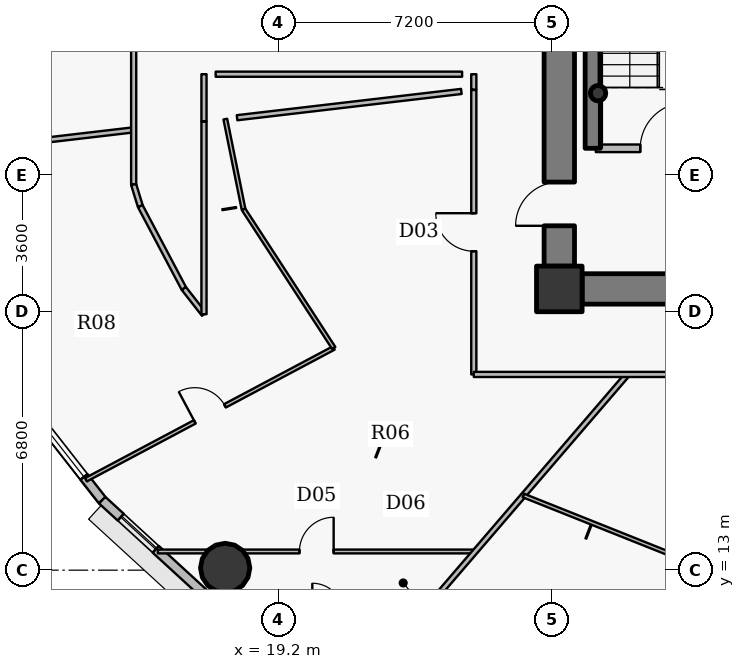
"""IFC4 building model, lengths in metres.
Left out: names, types, materials, properties, quantities, classifications, styles, units other than length and angle.
Written with IfcOpenShell. Run it as: python <this file> out.ifc"""

import sys

from ifc_helpers import new_model, si_unit, direction, frame, frame_2d, origin, origin_2d, place, context, subcontext, project, spatial, rectangle, hollow_circle, extrude, source, transform, mapped, element, fill, save


model = new_model("IFC4")
c1 = context("Model", 3, precision=1e-05, world=origin(), true_north=direction((0.0, 1.0)))
c2 = subcontext(c1, "Body", "Model", "MODEL_VIEW")
j1 = project(units=[si_unit("LENGTHUNIT", "METRE"), si_unit("PLANEANGLEUNIT", "RADIAN")], contexts=[c1])
p1 = place(None, origin())
s1 = spatial("IfcSite", under=j1, at=p1, CompositionType="ELEMENT")
p2 = place(p1, origin())
s2 = spatial("IfcBuilding", under=s1, at=p2, CompositionType="ELEMENT")
p3 = place(p2, frame((0.0, 0.0, 174.9)))
s3 = spatial("IfcBuildingStorey", under=s2, at=p3, CompositionType="ELEMENT", Elevation=174.9)
p4 = place(p3, frame((26.6, 20.4, 0.0), z_axis=(0.0, 0.0, 1.0), x_axis=(1.0, 0.0, 0.0)))
e1 = element("IfcColumn", 1, at=p4, inside=s3, PredefinedType="COLUMN", context=c2, shape_type="SweptSolid", body=[
    extrude(rectangle(XDim=1.2, YDim=1.2, at=origin_2d()), origin(), (0.0, 0.0, 1.0), 3.75),
])
p5 = place(p3, frame((27.48, 24.1, 0.0), z_axis=(0.0, 0.0, 1.0), x_axis=(0.0, 1.0, 0.0)))
e2 = element("IfcWall", 2, at=p5, inside=s3, PredefinedType="SHEAR", context=c2, shape_type="SweptSolid", body=[
    extrude(rectangle(XDim=8.6, YDim=0.4, at=frame_2d((4.3, 0.0))), origin(), (0.0, 0.0, 1.0), 3.75),
])
p6 = place(p3, frame((27.62, 25.55, 0.0), z_axis=(0.0, 0.0, 1.0), x_axis=(1.0, 0.0, 0.0)))
e3 = element("IfcColumn", 3, at=p6, inside=s3, PredefinedType="COLUMN", context=c2, shape_type="SweptSolid", body=[
    extrude(hollow_circle(Radius=0.203, WallThickness=0.016, at=origin_2d()), origin(), (0.0, 0.0, 1.0), 3.75),
])
p7 = place(p3, frame((44.8, 20.4, 0.0), z_axis=(0.0, 0.0, 1.0), x_axis=(-1.0, 0.0, 0.0)))
e4 = element("IfcWall", 4, at=p7, inside=s3, PredefinedType="SHEAR", context=c2, shape_type="SweptSolid", body=[
    extrude(rectangle(XDim=17.6, YDim=0.8, at=frame_2d((8.8, 0.0))), origin(), (0.0, 0.0, 1.0), 2.95),
])
p8 = place(p7, frame((9.55, 0.0, 0.0)))
e5 = element("IfcOpeningElement", 5, at=p8, cuts=e4, PredefinedType="OPENING", context=c2, shape_type="SweptSolid", body=[
    extrude(rectangle(XDim=1.15, YDim=2.15, at=origin_2d()), frame((0.575, 0.41, 1.075), z_axis=(0.0, -1.0, 0.0), x_axis=(1.0, 0.0, 0.0)), (0.0, 0.0, 1.0), 0.82),
])
p9 = place(p3, frame((26.6, 21.0, 0.0), z_axis=(0.0, 0.0, 1.0), x_axis=(0.0, 1.0, 0.0)))
e6 = element("IfcWall", 6, at=p9, inside=s3, PredefinedType="SHEAR", context=c2, shape_type="SweptSolid", body=[
    extrude(rectangle(XDim=12.0, YDim=0.8, at=frame_2d((6.0, 0.0))), origin(), (0.0, 0.0, 1.0), 2.95),
])
p10 = place(p9, frame((1.061, 0.0, 0.0)))
e7 = element("IfcOpeningElement", 7, at=p10, cuts=e6, PredefinedType="OPENING", context=c2, shape_type="SweptSolid", body=[
    extrude(rectangle(XDim=1.15, YDim=2.15, at=origin_2d()), frame((0.575, 0.41, 1.075), z_axis=(0.0, -1.0, 0.0), x_axis=(1.0, 0.0, 0.0)), (0.0, 0.0, 1.0), 0.82),
])
p11 = place(p3, frame((17.808, 13.058, 0.0), z_axis=(0.0, 0.0, 1.0), x_axis=(1.0, 0.0, 0.0)))
e8 = element("IfcColumn", 8, at=p11, inside=s3, PredefinedType="COLUMN", context=c2, shape_type="SweptSolid", body=[
    extrude(hollow_circle(Radius=0.65, WallThickness=0.04, at=origin_2d()), origin(), (0.0, 0.0, 1.0), 3.75),
])
p12 = place(p3, frame((14.572, 14.842, 0.0), z_axis=(0.0, 0.0, 1.0), x_axis=(-0.616287674549, 0.787521112224, 0.0)))
e9 = element("IfcWall", 9, at=p12, inside=s3, PredefinedType="SOLIDWALL", context=c2, shape_type="SweptSolid", body=[
    extrude(rectangle(XDim=3.517, YDim=0.24, at=frame_2d((1.759, 0.0))), origin(), (0.0, 0.0, 1.0), 3.5),
])
p13 = place(p12, frame((0.779, 0.0, 0.9)))
e10 = element("IfcOpeningElement", 10, at=p13, cuts=e9, PredefinedType="OPENING", context=c2, shape_type="SweptSolid", body=[
    extrude(rectangle(XDim=2.0, YDim=1.75, at=origin_2d()), frame((1.0, 0.13, 0.875), z_axis=(0.0, -1.0, 0.0), x_axis=(1.0, 0.0, 0.0)), (0.0, 0.0, 1.0), 0.26),
])
p14 = place(p3, frame((17.268, 12.369, 0.0), z_axis=(0.0, 0.0, 1.0), x_axis=(-0.737076565834, 0.675809245349, 0.0)))
e11 = element("IfcWall", 11, at=p14, inside=s3, PredefinedType="SOLIDWALL", context=c2, shape_type="SweptSolid", body=[
    extrude(rectangle(XDim=3.658, YDim=0.24, at=frame_2d((1.829, 0.0))), origin(), (0.0, 0.0, 1.0), 3.5),
])
p15 = place(p14, frame((1.746, 0.0, 0.9)))
e12 = element("IfcOpeningElement", 12, at=p15, cuts=e11, PredefinedType="OPENING", context=c2, shape_type="SweptSolid", body=[
    extrude(rectangle(XDim=1.25, YDim=1.65, at=origin_2d()), frame((0.625, 0.13, 0.825), z_axis=(0.0, -1.0, 0.0), x_axis=(1.0, 0.0, 0.0)), (0.0, 0.0, 1.0), 0.26),
])
p16 = place(p3, frame((9.828, 23.933, 0.0), z_axis=(0.0, 0.0, 1.0), x_axis=(0.993205157511, 0.116376608877, 0.0)))
e13 = element("IfcWall", 13, at=p16, inside=s3, PredefinedType="PARTITIONING", context=c2, shape_type="SweptSolid", body=[
    extrude(rectangle(XDim=5.61, YDim=0.135, at=frame_2d((2.805, 0.0))), origin(), (0.0, 0.0, 1.0), 2.935),
])
p17 = place(p3, frame((14.145, 15.379, 0.0), z_axis=(0.0, 0.0, 1.0), x_axis=(0.882946160832, 0.469474256027, 0.0)))
e14 = element("IfcWall", 14, at=p17, inside=s3, PredefinedType="PARTITIONING", context=c2, shape_type="SweptSolid", body=[
    extrude(rectangle(XDim=7.385, YDim=0.1, at=frame_2d((3.692, 0.0))), origin(), (0.0, 0.0, 1.0), 2.935),
])
p18 = place(p17, frame((3.242, 0.0, 0.0)))
e15 = element("IfcOpeningElement", 15, at=p18, cuts=e14, PredefinedType="OPENING", context=c2, shape_type="SweptSolid", body=[
    extrude(rectangle(XDim=0.9, YDim=2.1, at=origin_2d()), frame((0.45, 0.06, 1.05), z_axis=(0.0, -1.0, 0.0), x_axis=(1.0, 0.0, 0.0)), (0.0, 0.0, 1.0), 0.12),
])
p19 = place(p3, frame((15.4, 23.146, 0.0), z_axis=(0.0, 0.0, 1.0), x_axis=(0.0, 1.0, 0.0)))
e16 = element("IfcWall", 16, at=p19, inside=s3, PredefinedType="PARTITIONING", context=c2, shape_type="SweptSolid", body=[
    extrude(rectangle(XDim=4.804, YDim=0.135, at=frame_2d((2.402, 0.0))), origin(), (0.0, 0.0, 1.0), 2.935),
])
p20 = place(p3, frame((15.4, 23.146, 0.0), z_axis=(0.0, 0.0, 1.0), x_axis=(0.293335154151, -0.956009669061, 0.0)))
e17 = element("IfcWall", 17, at=p20, inside=s3, PredefinedType="PARTITIONING", context=c2, shape_type="SweptSolid", body=[
    extrude(rectangle(XDim=0.594, YDim=0.135, at=frame_2d((0.297, 0.0))), origin(), (0.0, 0.0, 1.0), 3.5),
])
p21 = place(p3, frame((15.574, 22.578, 0.0), z_axis=(0.0, 0.0, 1.0), x_axis=(0.46757196543, -0.883955008552, 0.0)))
e18 = element("IfcWall", 18, at=p21, inside=s3, PredefinedType="PARTITIONING", context=c2, shape_type="SweptSolid", body=[
    extrude(rectangle(XDim=2.451, YDim=0.135, at=frame_2d((1.226, 0.0))), origin(), (0.0, 0.0, 1.0), 2.935),
])
p22 = place(p3, frame((16.037, 13.491, 0.0), z_axis=(0.0, 0.0, 1.0), x_axis=(1.0, 0.0, 0.0)))
e19 = element("IfcWall", 19, at=p22, inside=s3, PredefinedType="PARTITIONING", context=c2, shape_type="SweptSolid", body=[
    extrude(rectangle(XDim=8.35, YDim=0.1, at=frame_2d((4.175, 0.0))), origin(), (0.0, 0.0, 1.0), 2.935),
])
p23 = place(p22, frame((3.725, 0.0, 0.0)))
e20 = element("IfcOpeningElement", 20, at=p23, cuts=e19, PredefinedType="OPENING", context=c2, shape_type="SweptSolid", body=[
    extrude(rectangle(XDim=0.9, YDim=2.1, at=origin_2d()), frame((0.45, 0.06, 1.05), z_axis=(0.0, -1.0, 0.0), x_axis=(1.0, 0.0, 0.0)), (0.0, 0.0, 1.0), 0.12),
])
p24 = place(p3, frame((16.72, 20.411, 0.0), z_axis=(0.0, 0.0, 1.0), x_axis=(0.616377221056, -0.787451027914, 0.0)))
e21 = element("IfcWall", 21, at=p24, inside=s3, PredefinedType="PARTITIONING", context=c2, shape_type="SweptSolid", body=[
    extrude(rectangle(XDim=0.859, YDim=0.135, at=frame_2d((0.43, 0.0))), origin(), (0.0, 0.0, 1.0), 3.5),
])
p25 = place(p3, frame((17.25, 19.734, 0.0), z_axis=(0.0, 0.0, 1.0), x_axis=(0.0, 1.0, 0.0)))
e22 = element("IfcWall", 22, at=p25, inside=s3, PredefinedType="PARTITIONING", context=c2, shape_type="SweptSolid", body=[
    extrude(rectangle(XDim=5.068, YDim=0.135, at=frame_2d((2.534, 0.0))), origin(), (0.0, 0.0, 1.0), 2.935),
])
p26 = place(p3, frame((17.811, 24.868, 0.0), z_axis=(0.0, 0.0, 1.0), x_axis=(0.198247700743, -0.980151952072, 0.0)))
e23 = element("IfcWall", 23, at=p26, inside=s3, PredefinedType="PARTITIONING", context=c2, shape_type="SweptSolid", body=[
    extrude(rectangle(XDim=2.422, YDim=0.1, at=frame_2d((1.211, 0.0))), origin(), (0.0, 0.0, 1.0), 2.935),
])
p27 = place(p3, frame((18.291, 22.494, 0.0), z_axis=(0.0, 0.0, 1.0), x_axis=(0.545410225271, -0.838169246734, 0.0)))
e24 = element("IfcWall", 24, at=p27, inside=s3, PredefinedType="PARTITIONING", context=c2, shape_type="SweptSolid", body=[
    extrude(rectangle(XDim=4.352, YDim=0.1, at=frame_2d((2.176, 0.0))), origin(), (0.0, 0.0, 1.0), 2.935),
])
p28 = place(p3, frame((21.259, 9.852, 0.0), z_axis=(0.0, 0.0, 1.0), x_axis=(0.651889454341, 0.758314011026, 0.0)))
e25 = element("IfcWall", 25, at=p28, inside=s3, PredefinedType="PARTITIONING", context=c2, shape_type="SweptSolid", body=[
    extrude(rectangle(XDim=10.942, YDim=0.135, at=frame_2d((5.471, 0.0))), origin(), (0.0, 0.0, 1.0), 2.935),
])
p29 = place(p3, frame((24.35, 18.15, 0.0), z_axis=(0.0, 0.0, 1.0), x_axis=(0.0, 1.0, 0.0)))
e26 = element("IfcWall", 26, at=p29, inside=s3, PredefinedType="PARTITIONING", context=c2, shape_type="SweptSolid", body=[
    extrude(rectangle(XDim=7.485, YDim=0.135, at=frame_2d((3.742, 0.0))), origin(), (0.0, 0.0, 1.0), 2.935),
])
p30 = place(p29, frame((3.242, 0.0, 0.0)))
e27 = element("IfcOpeningElement", 27, at=p30, cuts=e26, PredefinedType="OPENING", context=c2, shape_type="SweptSolid", body=[
    extrude(rectangle(XDim=1.0, YDim=2.15, at=origin_2d()), frame((0.5, 0.078, 1.075), z_axis=(0.0, -1.0, 0.0), x_axis=(1.0, 0.0, 0.0)), (0.0, 0.0, 1.0), 0.155),
])
p31 = place(p3, frame((24.35, 18.15, 0.0), z_axis=(0.0, 0.0, 1.0), x_axis=(1.0, 0.0, 0.0)))
e28 = element("IfcWall", 28, at=p31, inside=s3, PredefinedType="PARTITIONING", context=c2, shape_type="SweptSolid", body=[
    extrude(rectangle(XDim=11.341, YDim=0.135, at=frame_2d((5.67, 0.0))), origin(), (0.0, 0.0, 1.0), 2.935),
])
p32 = place(p31, frame((7.171, 0.0, 0.0)))
e29 = element("IfcOpeningElement", 29, at=p32, cuts=e28, PredefinedType="OPENING", context=c2, shape_type="SweptSolid", body=[
    extrude(rectangle(XDim=1.0, YDim=2.15, at=origin_2d()), frame((0.5, 0.078, 1.075), z_axis=(0.0, -1.0, 0.0), x_axis=(1.0, 0.0, 0.0)), (0.0, 0.0, 1.0), 0.155),
])
p33 = place(p3, frame((25.654, 14.965, 0.0), z_axis=(0.0, 0.0, 1.0), x_axis=(0.928793067963, -0.370598754589, 0.0)))
e30 = element("IfcWall", 30, at=p33, inside=s3, PredefinedType="PARTITIONING", context=c2, shape_type="SweptSolid", body=[
    extrude(rectangle(XDim=4.944, YDim=0.1, at=frame_2d((2.472, 0.0))), origin(), (0.0, 0.0, 1.0), 2.935),
])
p34 = place(p3, frame((27.56, 24.1, 0.0), z_axis=(0.0, 0.0, 1.0), x_axis=(1.0, 0.0, 0.0)))
e31 = element("IfcWall", 31, at=p34, inside=s3, PredefinedType="PARTITIONING", context=c2, shape_type="SweptSolid", body=[
    extrude(rectangle(XDim=3.54, YDim=0.2, at=frame_2d((1.77, 0.0))), origin(), (0.0, 0.0, 1.0), 3.5),
])
p35 = place(p34, frame((1.17, 0.0, 0.0)))
e32 = element("IfcOpeningElement", 32, at=p35, cuts=e31, PredefinedType="OPENING", context=c2, shape_type="SweptSolid", body=[
    extrude(rectangle(XDim=1.2, YDim=2.15, at=origin_2d()), frame((0.6, 0.11, 1.075), z_axis=(0.0, -1.0, 0.0), x_axis=(1.0, 0.0, 0.0)), (0.0, 0.0, 1.0), 0.22),
])
p36 = place(p3, frame((28.271, 7.219, 0.0), z_axis=(0.0, 0.0, 1.0), x_axis=(0.363936593544, 0.931423725207, 0.0)))
e33 = element("IfcWall", 33, at=p36, inside=s3, PredefinedType="PARTITIONING", context=c2, shape_type="SweptSolid", body=[
    extrude(rectangle(XDim=6.306, YDim=0.1, at=frame_2d((3.153, 0.0))), origin(), (0.0, 0.0, 1.0), 2.935),
])
p37 = place(p36, frame((2.703, 0.0, 0.0)))
e34 = element("IfcOpeningElement", 34, at=p37, cuts=e33, PredefinedType="OPENING", context=c2, shape_type="SweptSolid", body=[
    extrude(rectangle(XDim=0.9, YDim=2.1, at=origin_2d()), frame((0.45, 0.06, 1.05), z_axis=(0.0, -1.0, 0.0), x_axis=(1.0, 0.0, 0.0)), (0.0, 0.0, 1.0), 0.12),
])
p38 = place(p3, frame((17.25, 26.05, 0.0), z_axis=(0.0, 0.0, 1.0), x_axis=(0.0, -1.0, 0.0)))
e35 = element("IfcWall", 35, at=p38, inside=s3, PredefinedType="PARTITIONING", context=c2, shape_type="SweptSolid", body=[
    extrude(rectangle(XDim=1.238, YDim=0.135, at=frame_2d((0.619, 0.0))), origin(), (0.0, 0.0, 1.0), 3.185),
])
p39 = place(p3, frame((26.2, 20.99, 0.0), z_axis=(0.0, 0.0, 1.0), x_axis=(0.0, -1.0, 0.0)))
e36 = element("IfcWall", 36, at=p39, inside=s3, PredefinedType="PARTITIONING", context=c2, shape_type="SweptSolid", body=[
    extrude(rectangle(XDim=0.99, YDim=0.135, at=frame_2d((0.495, 0.0))), origin(), (0.0, 0.0, 1.0), 3.5),
])
p40 = place(p3, frame((26.508, 20.0, 0.0), z_axis=(0.0, 0.0, 1.0), x_axis=(1.0, 0.0, 0.0)))
e37 = element("IfcWall", 37, at=p40, inside=s3, PredefinedType="PARTITIONING", context=c2, shape_type="SweptSolid", body=[
    extrude(rectangle(XDim=0.682, YDim=0.135, at=frame_2d((0.341, 0.0))), origin(), (0.0, 0.0, 1.0), 2.935),
])
p41 = place(p3, frame((24.35, 25.645, 0.0), z_axis=(0.0, 0.0, 1.0), x_axis=(0.0, 1.0, 0.0)))
e38 = element("IfcWall", 38, at=p41, inside=s3, PredefinedType="PARTITIONING", context=c2, shape_type="SweptSolid", body=[
    extrude(rectangle(XDim=0.405, YDim=0.135, at=frame_2d((0.203, 0.0))), origin(), (0.0, 0.0, 1.0), 3.5),
])
p42 = place(p3, frame((24.042, 26.05, 0.0), z_axis=(0.0, 0.0, 1.0), x_axis=(-1.0, 0.0, 0.0)))
e39 = element("IfcWall", 39, at=p42, inside=s3, PredefinedType="PARTITIONING", context=c2, shape_type="SweptSolid", body=[
    extrude(rectangle(XDim=6.485, YDim=0.135, at=frame_2d((3.242, 0.0))), origin(), (0.0, 0.0, 1.0), 3.5),
])
p43 = place(p3, frame((18.12, 24.905, 0.0), z_axis=(0.0, 0.0, 1.0), x_axis=(0.993204061109, 0.116385965632, 0.0)))
e40 = element("IfcWall", 40, at=p43, inside=s3, PredefinedType="PARTITIONING", context=c2, shape_type="SweptSolid", body=[
    extrude(rectangle(XDim=5.943, YDim=0.135, at=frame_2d((2.971, 0.0))), origin(), (0.0, 0.0, 1.0), 3.5),
])
m1 = source(origin(), c2, "Body", "SweptSolid", [
    extrude(rectangle(XDim=2.0, YDim=1.75, at=origin_2d()), frame((1.0, 0.03, 0.875), z_axis=(0.0, -1.0, 0.0), x_axis=(1.0, 0.0, 0.0)), (0.0, 0.0, 1.0), 0.06),
])
p44 = place(p13, origin())
e41 = element("IfcWindow", 41, at=p44, inside=s3, PartitioningType="DOUBLE_PANEL_VERTICAL", PredefinedType="WINDOW", context=c2, shape_type="MappedRepresentation", body=[
    mapped(m1, transform((0.0, 0.0, 0.0), x_axis=(1.0, 0.0, 0.0), y_axis=(0.0, 1.0, 0.0), z_axis=(0.0, 0.0, 1.0), scale=1.0)),
])
fill(e10, e41)
m2 = source(origin(), c2, "Body", "SweptSolid", [
    extrude(rectangle(XDim=1.25, YDim=1.65, at=origin_2d()), frame((0.625, 0.03, 0.825), z_axis=(0.0, -1.0, 0.0), x_axis=(1.0, 0.0, 0.0)), (0.0, 0.0, 1.0), 0.06),
])
p45 = place(p15, origin())
e42 = element("IfcWindow", 42, at=p45, inside=s3, PartitioningType="SINGLE_PANEL", PredefinedType="WINDOW", context=c2, shape_type="MappedRepresentation", body=[
    mapped(m2, transform((0.0, 0.0, 0.0), x_axis=(1.0, 0.0, 0.0), y_axis=(0.0, 1.0, 0.0), z_axis=(0.0, 0.0, 1.0), scale=1.0)),
])
fill(e12, e42)
m3 = source(origin(), c2, "Body", "SweptSolid", [
    extrude(rectangle(XDim=1.15, YDim=2.15, at=origin_2d()), frame((0.575, 0.025, 1.075), z_axis=(0.0, -1.0, 0.0), x_axis=(1.0, 0.0, 0.0)), (0.0, 0.0, 1.0), 0.05),
])
p46 = place(p10, origin())
e43 = element("IfcDoor", 43, at=p46, inside=s3, OperationType="SINGLE_SWING_LEFT", PredefinedType="DOOR", context=c2, shape_type="MappedRepresentation", body=[
    mapped(m3, transform((0.0, 0.0, 0.0), x_axis=(1.0, 0.0, 0.0), y_axis=(0.0, 1.0, 0.0), z_axis=(0.0, 0.0, 1.0), scale=1.0)),
])
fill(e7, e43)
m4 = source(origin(), c2, "Body", "SweptSolid", [
    extrude(rectangle(XDim=1.2, YDim=2.15, at=origin_2d()), frame((0.6, 0.025, 1.075), z_axis=(0.0, -1.0, 0.0), x_axis=(1.0, 0.0, 0.0)), (0.0, 0.0, 1.0), 0.05),
])
p47 = place(p35, origin())
e44 = element("IfcDoor", 44, at=p47, inside=s3, OperationType="SINGLE_SWING_RIGHT", PredefinedType="DOOR", context=c2, shape_type="MappedRepresentation", body=[
    mapped(m4, transform((0.0, 0.0, 0.0), x_axis=(1.0, 0.0, 0.0), y_axis=(0.0, 1.0, 0.0), z_axis=(0.0, 0.0, 1.0), scale=1.0)),
])
fill(e32, e44)
m5 = source(origin(), c2, "Body", "SweptSolid", [
    extrude(rectangle(XDim=1.0, YDim=2.15, at=origin_2d()), frame((0.5, 0.025, 1.075), z_axis=(0.0, -1.0, 0.0), x_axis=(1.0, 0.0, 0.0)), (0.0, 0.0, 1.0), 0.05),
])
p48 = place(p30, origin())
e45 = element("IfcDoor", 45, at=p48, inside=s3, OperationType="SINGLE_SWING_RIGHT", PredefinedType="DOOR", context=c2, shape_type="MappedRepresentation", body=[
    mapped(m5, transform((0.0, 0.0, 0.0), x_axis=(1.0, 0.0, 0.0), y_axis=(0.0, 1.0, 0.0), z_axis=(0.0, 0.0, 1.0), scale=1.0)),
])
fill(e27, e45)
m6 = source(origin(), c2, "Body", "SweptSolid", [
    extrude(rectangle(XDim=0.9, YDim=2.1, at=origin_2d()), frame((0.45, 0.025, 1.05), z_axis=(0.0, -1.0, 0.0), x_axis=(1.0, 0.0, 0.0)), (0.0, 0.0, 1.0), 0.05),
])
p49 = place(p18, origin())
e46 = element("IfcDoor", 46, at=p49, inside=s3, OperationType="SINGLE_SWING_LEFT", PredefinedType="DOOR", context=c2, shape_type="MappedRepresentation", body=[
    mapped(m6, transform((0.0, 0.0, 0.0), x_axis=(1.0, 0.0, 0.0), y_axis=(0.0, 1.0, 0.0), z_axis=(0.0, 0.0, 1.0), scale=1.0)),
])
fill(e15, e46)
p50 = place(p23, origin())
e47 = element("IfcDoor", 47, at=p50, inside=s3, OperationType="SINGLE_SWING_RIGHT", PredefinedType="DOOR", context=c2, shape_type="MappedRepresentation", body=[
    mapped(m6, transform((0.0, 0.0, 0.0), x_axis=(1.0, 0.0, 0.0), y_axis=(0.0, 1.0, 0.0), z_axis=(0.0, 0.0, 1.0), scale=1.0)),
])
fill(e20, e47)
save(model, sys.argv[1])
